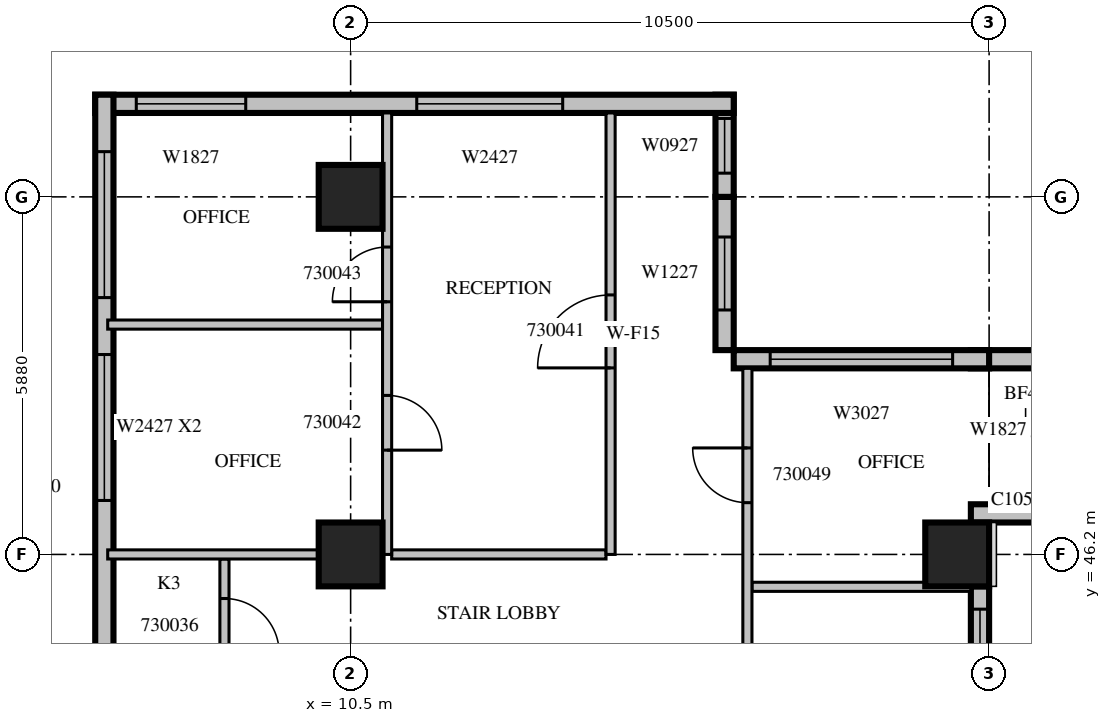
"""IFC4 building model, lengths in metres.
Left out: names, types, materials, properties, quantities, classifications, styles, units other than length and angle.
Written with IfcOpenShell. Run it as: python <this file> out.ifc"""

import sys

from ifc_helpers import new_model, si_unit, direction, frame, frame_2d, origin, origin_2d, place, context, subcontext, project, spatial, rectangle, extrude, source, transform, mapped, element, fill, save


model = new_model("IFC4")
c1 = context("Model", 3, precision=1e-05, world=origin(), true_north=direction((0.0, 1.0)))
c2 = subcontext(c1, "Body", "Model", "MODEL_VIEW")
j1 = project(units=[si_unit("LENGTHUNIT", "METRE"), si_unit("PLANEANGLEUNIT", "RADIAN")], contexts=[c1])
p1 = place(None, origin())
s1 = spatial("IfcSite", under=j1, at=p1, CompositionType="ELEMENT")
p2 = place(p1, origin())
s2 = spatial("IfcBuilding", under=s1, at=p2, CompositionType="ELEMENT")
p3 = place(p2, frame((0.0, 0.0, 137.1)))
s3 = spatial("IfcBuildingStorey", under=s2, at=p3, CompositionType="ELEMENT", Elevation=137.1)
m1 = source(origin(), c2, "Body", "SweptSolid", [
    extrude(rectangle(XDim=1.05, YDim=1.05, at=origin_2d()), origin(), (0.0, 0.0, 1.0), 4.2),
])
for number, where, z_axis, x_axis in (
    (1, (10.5, 46.2, 0.0), (0.0, 0.0, 1.0), (1.0, 0.0, 0.0)),
    (2, (20.475, 46.2, 0.0), (0.0, 0.0, 1.0), (1.0, 0.0, 0.0)),
    (3, (10.5, 52.08, 0.0), (0.0, 0.0, 1.0), (1.0, 0.0, 0.0)),
):
    element("IfcColumn", number, at=place(p3, frame(where, z_axis=z_axis, x_axis=x_axis)), inside=s3, PredefinedType="COLUMN", context=c2, shape_type="MappedRepresentation", body=[
        mapped(m1, transform((0.0, 0.0, 0.0), scale=1.0)),
    ])
m2 = source(origin(), c2, "Body", "SweptSolid", [
    extrude(rectangle(XDim=7.35, YDim=0.3, at=frame_2d((3.675, 0.0))), origin(), (0.0, 0.0, 1.0), 3.8),
])
p4 = place(p3, frame((20.85, 38.325, 0.0), z_axis=(0.0, 0.0, 1.0), x_axis=(0.0, 1.0, 0.0)))
e4 = element("IfcWall", 4, at=p4, inside=s3, PredefinedType="STANDARD", context=c2, shape_type="MappedRepresentation", body=[
    mapped(m2, transform((0.0, 0.0, 0.0), scale=1.0)),
])
m3 = source(origin(), c2, "Body", "SweptSolid", [
    extrude(rectangle(XDim=2.4, YDim=2.7, at=frame_2d((1.2, 1.35))), frame((0.0, 0.16, 0.0), z_axis=(0.0, -1.0, 0.0), x_axis=(1.0, 0.0, 0.0)), (0.0, 0.0, 1.0), 0.32),
])
p5 = place(p4, frame((0.375, 0.0, 0.6)))
e5 = element("IfcOpeningElement", 5, at=p5, cuts=e4, PredefinedType="OPENING", context=c2, shape_type="MappedRepresentation", body=[
    mapped(m3, transform((0.0, 0.0, 0.0), scale=1.0)),
])
p6 = place(p4, frame((4.575, 0.0, 0.6)))
e6 = element("IfcOpeningElement", 6, at=p6, cuts=e4, PredefinedType="OPENING", context=c2, shape_type="MappedRepresentation", body=[
    mapped(m3, transform((0.0, 0.0, 0.0), scale=1.0)),
])
m4 = source(origin(), c2, "Body", "SweptSolid", [
    extrude(rectangle(XDim=1.2, YDim=0.3, at=frame_2d((0.6, 0.0))), origin(), (0.0, 0.0, 1.0), 3.8),
])
for number, where, z_axis, x_axis in (
    (7, (20.7, 46.875, 0.0), (0.0, 0.0, 1.0), (1.0, 0.0, 0.0)),
    (8, (20.7, 49.41, 0.0), (0.0, 0.0, 1.0), (1.0, 0.0, 0.0)),
):
    element("IfcWall", number, at=place(p3, frame(where, z_axis=z_axis, x_axis=x_axis)), inside=s3, PredefinedType="STANDARD", context=c2, shape_type="MappedRepresentation", body=[
        mapped(m4, transform((0.0, 0.0, 0.0), scale=1.0)),
    ])
m5 = source(origin(), c2, "Body", "SweptSolid", [
    extrude(rectangle(XDim=4.2, YDim=0.3, at=frame_2d((2.1, 0.0))), origin(), (0.0, 0.0, 1.0), 3.8),
])
p7 = place(p3, frame((21.0, 49.41, 0.0), z_axis=(0.0, 0.0, 1.0), x_axis=(-1.0, 0.0, 0.0)))
e9 = element("IfcWall", 9, at=p7, inside=s3, PredefinedType="STANDARD", context=c2, shape_type="MappedRepresentation", body=[
    mapped(m5, transform((0.0, 0.0, 0.0), scale=1.0)),
])
m6 = source(origin(), c2, "Body", "SweptSolid", [
    extrude(rectangle(XDim=3.0, YDim=2.7, at=frame_2d((1.5, 1.35))), frame((0.0, 0.16, 0.0), z_axis=(0.0, -1.0, 0.0), x_axis=(1.0, 0.0, 0.0)), (0.0, 0.0, 1.0), 0.32),
])
p8 = place(p7, frame((0.6, 0.0, 0.6)))
e10 = element("IfcOpeningElement", 10, at=p8, cuts=e9, PredefinedType="OPENING", context=c2, shape_type="MappedRepresentation", body=[
    mapped(m6, transform((0.0, 0.0, 0.0), scale=1.0)),
])
m7 = source(origin(), c2, "Body", "SweptSolid", [
    extrude(rectangle(XDim=2.52, YDim=0.3, at=frame_2d((1.26, 0.0))), origin(), (0.0, 0.0, 1.0), 3.8),
])
p9 = place(p3, frame((16.65, 49.56, 0.0), z_axis=(0.0, 0.0, 1.0), x_axis=(0.0, 1.0, 0.0)))
e11 = element("IfcWall", 11, at=p9, inside=s3, PredefinedType="STANDARD", context=c2, shape_type="MappedRepresentation", body=[
    mapped(m7, transform((0.0, 0.0, 0.0), scale=1.0)),
])
m8 = source(origin(), c2, "Body", "SweptSolid", [
    extrude(rectangle(XDim=1.2, YDim=2.7, at=frame_2d((0.6, 1.35))), frame((0.0, 0.16, 0.0), z_axis=(0.0, -1.0, 0.0), x_axis=(1.0, 0.0, 0.0)), (0.0, 0.0, 1.0), 0.32),
])
p10 = place(p9, frame((0.66, 0.0, 0.6)))
e12 = element("IfcOpeningElement", 12, at=p10, cuts=e11, PredefinedType="OPENING", context=c2, shape_type="MappedRepresentation", body=[
    mapped(m8, transform((0.0, 0.0, 0.0), scale=1.0)),
])
m9 = source(origin(), c2, "Body", "SweptSolid", [
    extrude(rectangle(XDim=1.68, YDim=0.3, at=frame_2d((0.84, 0.0))), origin(), (0.0, 0.0, 1.0), 3.8),
])
p11 = place(p3, frame((16.65, 52.08, 0.0), z_axis=(0.0, 0.0, 1.0), x_axis=(0.0, 1.0, 0.0)))
e13 = element("IfcWall", 13, at=p11, inside=s3, PredefinedType="STANDARD", context=c2, shape_type="MappedRepresentation", body=[
    mapped(m9, transform((0.0, 0.0, 0.0), scale=1.0)),
])
m10 = source(origin(), c2, "Body", "SweptSolid", [
    extrude(rectangle(XDim=0.9, YDim=2.7, at=frame_2d((0.45, 1.35))), frame((0.0, 0.16, 0.0), z_axis=(0.0, -1.0, 0.0), x_axis=(1.0, 0.0, 0.0)), (0.0, 0.0, 1.0), 0.32),
])
p12 = place(p11, frame((0.39, 0.0, 0.6)))
e14 = element("IfcOpeningElement", 14, at=p12, cuts=e13, PredefinedType="OPENING", context=c2, shape_type="MappedRepresentation", body=[
    mapped(m10, transform((0.0, 0.0, 0.0), scale=1.0)),
])
m11 = source(origin(), c2, "Body", "SweptSolid", [
    extrude(rectangle(XDim=10.5, YDim=0.3, at=frame_2d((5.25, 0.0))), origin(), (0.0, 0.0, 1.0), 3.8),
])
p13 = place(p3, frame((16.8, 53.61, 0.0), z_axis=(0.0, 0.0, 1.0), x_axis=(-1.0, 0.0, 0.0)))
e15 = element("IfcWall", 15, at=p13, inside=s3, PredefinedType="STANDARD", context=c2, shape_type="MappedRepresentation", body=[
    mapped(m11, transform((0.0, 0.0, 0.0), scale=1.0)),
])
m12 = source(origin(), c2, "Body", "SweptSolid", [
    extrude(rectangle(XDim=1.8, YDim=2.7, at=frame_2d((0.9, 1.35))), frame((0.0, 0.16, 0.0), z_axis=(0.0, -1.0, 0.0), x_axis=(1.0, 0.0, 0.0)), (0.0, 0.0, 1.0), 0.32),
])
p14 = place(p13, frame((8.025, 0.0, 0.6)))
e16 = element("IfcOpeningElement", 16, at=p14, cuts=e15, PredefinedType="OPENING", context=c2, shape_type="MappedRepresentation", body=[
    mapped(m12, transform((0.0, 0.0, 0.0), scale=1.0)),
])
p15 = place(p13, frame((2.812, 0.0, 0.6)))
e17 = element("IfcOpeningElement", 17, at=p15, cuts=e15, PredefinedType="OPENING", context=c2, shape_type="MappedRepresentation", body=[
    mapped(m3, transform((0.0, 0.0, 0.0), scale=1.0)),
])
m13 = source(origin(), c2, "Body", "SweptSolid", [
    extrude(rectangle(XDim=9.91, YDim=0.3, at=frame_2d((4.955, 0.0))), origin(), (0.0, 0.0, 1.0), 3.8),
])
p16 = place(p3, frame((6.45, 53.76, 0.0), z_axis=(0.0, 0.0, 1.0), x_axis=(0.0, -1.0, 0.0)))
e18 = element("IfcWall", 18, at=p16, inside=s3, PredefinedType="STANDARD", context=c2, shape_type="MappedRepresentation", body=[
    mapped(m13, transform((0.0, 0.0, 0.0), scale=1.0)),
])
p17 = place(p16, frame((4.272, 0.0, 0.6)))
e19 = element("IfcOpeningElement", 19, at=p17, cuts=e18, PredefinedType="OPENING", context=c2, shape_type="MappedRepresentation", body=[
    mapped(m3, transform((0.0, 0.0, 0.0), scale=1.0)),
])
p18 = place(p16, frame((0.936, 0.0, 0.6)))
e20 = element("IfcOpeningElement", 20, at=p18, cuts=e18, PredefinedType="OPENING", context=c2, shape_type="MappedRepresentation", body=[
    mapped(m3, transform((0.0, 0.0, 0.0), scale=1.0)),
])
m14 = source(origin(), c2, "Body", "SweptSolid", [
    extrude(rectangle(XDim=2.2, YDim=0.15, at=frame_2d((1.1, 0.0))), origin(), (0.0, 0.0, 1.0), 3.8),
])
p19 = place(p3, frame((8.425, 43.925, 0.0), z_axis=(0.0, 0.0, 1.0), x_axis=(0.0, 1.0, 0.0)))
e21 = element("IfcWall", 21, at=p19, inside=s3, PredefinedType="PARTITIONING", context=c2, shape_type="MappedRepresentation", body=[
    mapped(m14, transform((0.0, 0.0, 0.0), scale=1.0)),
])
m15 = source(origin(), c2, "Body", "SweptSolid", [
    extrude(rectangle(XDim=0.9, YDim=2.1, at=frame_2d((0.45, 1.05))), frame((0.0, 0.085, 0.0), z_axis=(0.0, -1.0, 0.0), x_axis=(1.0, 0.0, 0.0)), (0.0, 0.0, 1.0), 0.17),
])
p20 = place(p19, frame((0.65, 0.0, 0.0)))
e22 = element("IfcOpeningElement", 22, at=p20, cuts=e21, PredefinedType="OPENING", context=c2, shape_type="MappedRepresentation", body=[
    mapped(m15, transform((0.0, 0.0, 0.0), scale=1.0)),
])
m16 = source(origin(), c2, "Body", "SweptSolid", [
    extrude(rectangle(XDim=4.52, YDim=0.15, at=frame_2d((2.26, 0.0))), origin(), (0.0, 0.0, 1.0), 3.8),
])
p21 = place(p3, frame((11.025, 49.98, 0.0), z_axis=(0.0, 0.0, 1.0), x_axis=(-1.0, 0.0, 0.0)))
e23 = element("IfcWall", 23, at=p21, inside=s3, PredefinedType="PARTITIONING", context=c2, shape_type="MappedRepresentation", body=[
    mapped(m16, transform((0.0, 0.0, 0.0), scale=1.0)),
])
m17 = source(origin(), c2, "Body", "SweptSolid", [
    extrude(rectangle(XDim=3.471, YDim=0.15, at=frame_2d((1.736, 0.0))), origin(), (0.0, 0.0, 1.0), 3.8),
])
p22 = place(p3, frame((9.976, 46.2, 0.0), z_axis=(0.0, 0.0, 1.0), x_axis=(-1.0, 0.0, 0.0)))
e24 = element("IfcWall", 24, at=p22, inside=s3, PredefinedType="PARTITIONING", context=c2, shape_type="MappedRepresentation", body=[
    mapped(m17, transform((0.0, 0.0, 0.0), scale=1.0)),
])
m18 = source(origin(), c2, "Body", "SweptSolid", [
    extrude(rectangle(XDim=3.525, YDim=0.15, at=frame_2d((1.762, 0.0))), origin(), (0.0, 0.0, 1.0), 3.8),
])
p23 = place(p3, frame((14.7, 46.2, 0.0), z_axis=(0.0, 0.0, 1.0), x_axis=(-1.0, 0.0, 0.0)))
e25 = element("IfcWall", 25, at=p23, inside=s3, PredefinedType="PARTITIONING", context=c2, shape_type="MappedRepresentation", body=[
    mapped(m18, transform((0.0, 0.0, 0.0), scale=1.0)),
])
m19 = source(origin(), c2, "Body", "SweptSolid", [
    extrude(rectangle(XDim=7.26, YDim=0.15, at=frame_2d((3.63, 0.0))), origin(), (0.0, 0.0, 1.0), 3.8),
])
p24 = place(p3, frame((11.1, 46.2, 0.0), z_axis=(0.0, 0.0, 1.0), x_axis=(0.0, 1.0, 0.0)))
e26 = element("IfcWall", 26, at=p24, inside=s3, PredefinedType="PARTITIONING", context=c2, shape_type="MappedRepresentation", body=[
    mapped(m19, transform((0.0, 0.0, 0.0), scale=1.0)),
])
p25 = place(p24, frame((1.715, 0.0, 0.0)))
e27 = element("IfcOpeningElement", 27, at=p25, cuts=e26, PredefinedType="OPENING", context=c2, shape_type="MappedRepresentation", body=[
    mapped(m15, transform((0.0, 0.0, 0.0), scale=1.0)),
])
p26 = place(p24, frame((4.155, 0.0, 0.0)))
e28 = element("IfcOpeningElement", 28, at=p26, cuts=e26, PredefinedType="OPENING", context=c2, shape_type="MappedRepresentation", body=[
    mapped(m15, transform((0.0, 0.0, 0.0), scale=1.0)),
])
m20 = source(origin(), c2, "Body", "SweptSolid", [
    extrude(rectangle(XDim=3.6, YDim=0.15, at=frame_2d((1.8, 0.0))), origin(), (0.0, 0.0, 1.0), 3.8),
])
p27 = place(p3, frame((17.1, 45.667, 0.0), z_axis=(0.0, 0.0, 1.0), x_axis=(1.0, 0.0, 0.0)))
e29 = element("IfcWall", 29, at=p27, inside=s3, PredefinedType="PARTITIONING", context=c2, shape_type="MappedRepresentation", body=[
    mapped(m20, transform((0.0, 0.0, 0.0), scale=1.0)),
])
p28 = place(p3, frame((14.775, 46.2, 0.0), z_axis=(0.0, 0.0, 1.0), x_axis=(0.0, 1.0, 0.0)))
e30 = element("IfcWall", 30, at=p28, inside=s3, PredefinedType="PARTITIONING", context=c2, shape_type="MappedRepresentation", body=[
    mapped(m19, transform((0.0, 0.0, 0.0), scale=1.0)),
])
m21 = source(origin(), c2, "Body", "SweptSolid", [
    extrude(rectangle(XDim=1.2, YDim=2.1, at=frame_2d((0.6, 1.05))), frame((0.0, 0.085, 0.0), z_axis=(0.0, -1.0, 0.0), x_axis=(1.0, 0.0, 0.0)), (0.0, 0.0, 1.0), 0.17),
])
p29 = place(p28, frame((3.067, 0.0, 0.0)))
e31 = element("IfcOpeningElement", 31, at=p29, cuts=e30, PredefinedType="OPENING", context=c2, shape_type="MappedRepresentation", body=[
    mapped(m21, transform((0.0, 0.0, 0.0), scale=1.0)),
])
m22 = source(origin(), c2, "Body", "SweptSolid", [
    extrude(rectangle(XDim=19.86, YDim=0.15, at=frame_2d((9.93, 0.0))), origin(), (0.0, 0.0, 1.0), 3.8),
])
p30 = place(p3, frame((17.025, 49.26, 0.0), z_axis=(0.0, 0.0, 1.0), x_axis=(0.0, -1.0, 0.0)))
e32 = element("IfcWall", 32, at=p30, inside=s3, PredefinedType="PARTITIONING", context=c2, shape_type="MappedRepresentation", body=[
    mapped(m22, transform((0.0, 0.0, 0.0), scale=1.0)),
])
m23 = source(origin(), c2, "Body", "SweptSolid", [
    extrude(rectangle(XDim=1.0, YDim=2.1, at=frame_2d((0.5, 1.05))), frame((0.0, 0.085, 0.0), z_axis=(0.0, -1.0, 0.0), x_axis=(1.0, 0.0, 0.0)), (0.0, 0.0, 1.0), 0.17),
])
p31 = place(p30, frame((17.503, 0.0, 0.0)))
e33 = element("IfcOpeningElement", 33, at=p31, cuts=e32, PredefinedType="OPENING", context=c2, shape_type="MappedRepresentation", body=[
    mapped(m23, transform((0.0, 0.0, 0.0), scale=1.0)),
])
p32 = place(p30, frame((14.191, 0.0, 0.0)))
e34 = element("IfcOpeningElement", 34, at=p32, cuts=e32, PredefinedType="OPENING", context=c2, shape_type="MappedRepresentation", body=[
    mapped(m23, transform((0.0, 0.0, 0.0), scale=1.0)),
])
p33 = place(p30, frame((11.848, 0.0, 0.0)))
e35 = element("IfcOpeningElement", 35, at=p33, cuts=e32, PredefinedType="OPENING", context=c2, shape_type="MappedRepresentation", body=[
    mapped(m23, transform((0.0, 0.0, 0.0), scale=1.0)),
])
p34 = place(p30, frame((8.91, 0.0, 0.0)))
e36 = element("IfcOpeningElement", 36, at=p34, cuts=e32, PredefinedType="OPENING", context=c2, shape_type="MappedRepresentation", body=[
    mapped(m15, transform((0.0, 0.0, 0.0), scale=1.0)),
])
p35 = place(p30, frame((4.976, 0.0, 0.0)))
e37 = element("IfcOpeningElement", 37, at=p35, cuts=e32, PredefinedType="OPENING", context=c2, shape_type="MappedRepresentation", body=[
    mapped(m15, transform((0.0, 0.0, 0.0), scale=1.0)),
])
p36 = place(p30, frame((1.309, 0.0, 0.0)))
e38 = element("IfcOpeningElement", 38, at=p36, cuts=e32, PredefinedType="OPENING", context=c2, shape_type="MappedRepresentation", body=[
    mapped(m15, transform((0.0, 0.0, 0.0), scale=1.0)),
])
m24 = source(origin(), c2, "Body", "SweptSolid", [
    extrude(rectangle(XDim=2.4, YDim=2.7, at=frame_2d((1.2, 1.35))), frame((0.0, 0.03, 0.0), z_axis=(0.0, -1.0, 0.0), x_axis=(1.0, 0.0, 0.0)), (0.0, 0.0, 1.0), 0.06),
])
p37 = place(p6, origin())
e39 = element("IfcWindow", 39, at=p37, inside=s3, PartitioningType="SINGLE_PANEL", PredefinedType="WINDOW", context=c2, shape_type="MappedRepresentation", body=[
    mapped(m24, transform((0.0, 0.0, 0.0), scale=1.0)),
])
fill(e6, e39)
m25 = source(origin(), c2, "Body", "SweptSolid", [
    extrude(rectangle(XDim=3.0, YDim=2.7, at=frame_2d((1.5, 1.35))), frame((0.0, 0.03, 0.0), z_axis=(0.0, -1.0, 0.0), x_axis=(1.0, 0.0, 0.0)), (0.0, 0.0, 1.0), 0.06),
])
p38 = place(p8, origin())
e40 = element("IfcWindow", 40, at=p38, inside=s3, PartitioningType="SINGLE_PANEL", PredefinedType="WINDOW", context=c2, shape_type="MappedRepresentation", body=[
    mapped(m25, transform((0.0, 0.0, 0.0), scale=1.0)),
])
fill(e10, e40)
m26 = source(origin(), c2, "Body", "SweptSolid", [
    extrude(rectangle(XDim=1.2, YDim=2.7, at=frame_2d((0.6, 1.35))), frame((0.0, 0.03, 0.0), z_axis=(0.0, -1.0, 0.0), x_axis=(1.0, 0.0, 0.0)), (0.0, 0.0, 1.0), 0.06),
])
p39 = place(p10, origin())
e41 = element("IfcWindow", 41, at=p39, inside=s3, PartitioningType="SINGLE_PANEL", PredefinedType="WINDOW", context=c2, shape_type="MappedRepresentation", body=[
    mapped(m26, transform((0.0, 0.0, 0.0), scale=1.0)),
])
fill(e12, e41)
m27 = source(origin(), c2, "Body", "SweptSolid", [
    extrude(rectangle(XDim=0.9, YDim=2.7, at=frame_2d((0.45, 1.35))), frame((0.0, 0.03, 0.0), z_axis=(0.0, -1.0, 0.0), x_axis=(1.0, 0.0, 0.0)), (0.0, 0.0, 1.0), 0.06),
])
p40 = place(p12, origin())
e42 = element("IfcWindow", 42, at=p40, inside=s3, PartitioningType="SINGLE_PANEL", PredefinedType="WINDOW", context=c2, shape_type="MappedRepresentation", body=[
    mapped(m27, transform((0.0, 0.0, 0.0), scale=1.0)),
])
fill(e14, e42)
m28 = source(origin(), c2, "Body", "SweptSolid", [
    extrude(rectangle(XDim=1.8, YDim=2.7, at=frame_2d((0.9, 1.35))), frame((0.0, 0.03, 0.0), z_axis=(0.0, -1.0, 0.0), x_axis=(1.0, 0.0, 0.0)), (0.0, 0.0, 1.0), 0.06),
])
p41 = place(p14, origin())
e43 = element("IfcWindow", 43, at=p41, inside=s3, PartitioningType="SINGLE_PANEL", PredefinedType="WINDOW", context=c2, shape_type="MappedRepresentation", body=[
    mapped(m28, transform((0.0, 0.0, 0.0), scale=1.0)),
])
fill(e16, e43)
p42 = place(p15, origin())
e44 = element("IfcWindow", 44, at=p42, inside=s3, PartitioningType="SINGLE_PANEL", PredefinedType="WINDOW", context=c2, shape_type="MappedRepresentation", body=[
    mapped(m24, transform((0.0, 0.0, 0.0), scale=1.0)),
])
fill(e17, e44)
p43 = place(p17, origin())
e45 = element("IfcWindow", 45, at=p43, inside=s3, PartitioningType="SINGLE_PANEL", PredefinedType="WINDOW", context=c2, shape_type="MappedRepresentation", body=[
    mapped(m24, transform((0.0, 0.0, 0.0), scale=1.0)),
])
fill(e19, e45)
p44 = place(p18, origin())
e46 = element("IfcWindow", 46, at=p44, inside=s3, PartitioningType="SINGLE_PANEL", PredefinedType="WINDOW", context=c2, shape_type="MappedRepresentation", body=[
    mapped(m24, transform((0.0, 0.0, 0.0), scale=1.0)),
])
fill(e20, e46)
m29 = source(origin(), c2, "Body", "SweptSolid", [
    extrude(rectangle(XDim=0.9, YDim=2.1, at=frame_2d((0.45, 1.05))), frame((0.0, 0.025, 0.0), z_axis=(0.0, -1.0, 0.0), x_axis=(1.0, 0.0, 0.0)), (0.0, 0.0, 1.0), 0.05),
])
p45 = place(p20, origin())
e47 = element("IfcDoor", 47, at=p45, inside=s3, OperationType="SINGLE_SWING_RIGHT", PredefinedType="DOOR", context=c2, shape_type="MappedRepresentation", body=[
    mapped(m29, transform((0.0, 0.0, 0.0), scale=1.0)),
])
fill(e22, e47)
m30 = source(origin(), c2, "Body", "SweptSolid", [
    extrude(rectangle(XDim=1.2, YDim=2.1, at=frame_2d((0.6, 1.05))), frame((0.0, 0.025, 0.0), z_axis=(0.0, -1.0, 0.0), x_axis=(1.0, 0.0, 0.0)), (0.0, 0.0, 1.0), 0.05),
])
p46 = place(p29, origin())
e48 = element("IfcDoor", 48, at=p46, inside=s3, OperationType="SINGLE_SWING_LEFT", PredefinedType="DOOR", context=c2, shape_type="MappedRepresentation", body=[
    mapped(m30, transform((0.0, 0.0, 0.0), scale=1.0)),
])
fill(e31, e48)
p47 = place(p25, origin())
e49 = element("IfcDoor", 49, at=p47, inside=s3, OperationType="SINGLE_SWING_RIGHT", PredefinedType="DOOR", context=c2, shape_type="MappedRepresentation", body=[
    mapped(m29, transform((0.0, 0.0, 0.0), scale=1.0)),
])
fill(e27, e49)
p48 = place(p26, origin())
e50 = element("IfcDoor", 50, at=p48, inside=s3, OperationType="SINGLE_SWING_LEFT", PredefinedType="DOOR", context=c2, shape_type="MappedRepresentation", body=[
    mapped(m29, transform((0.0, 0.0, 0.0), scale=1.0)),
])
fill(e28, e50)
p49 = place(p36, origin())
e51 = element("IfcDoor", 51, at=p49, inside=s3, OperationType="SINGLE_SWING_RIGHT", PredefinedType="DOOR", context=c2, shape_type="MappedRepresentation", body=[
    mapped(m29, transform((0.0, 0.0, 0.0), scale=1.0)),
])
fill(e38, e51)
save(model, sys.argv[1])
